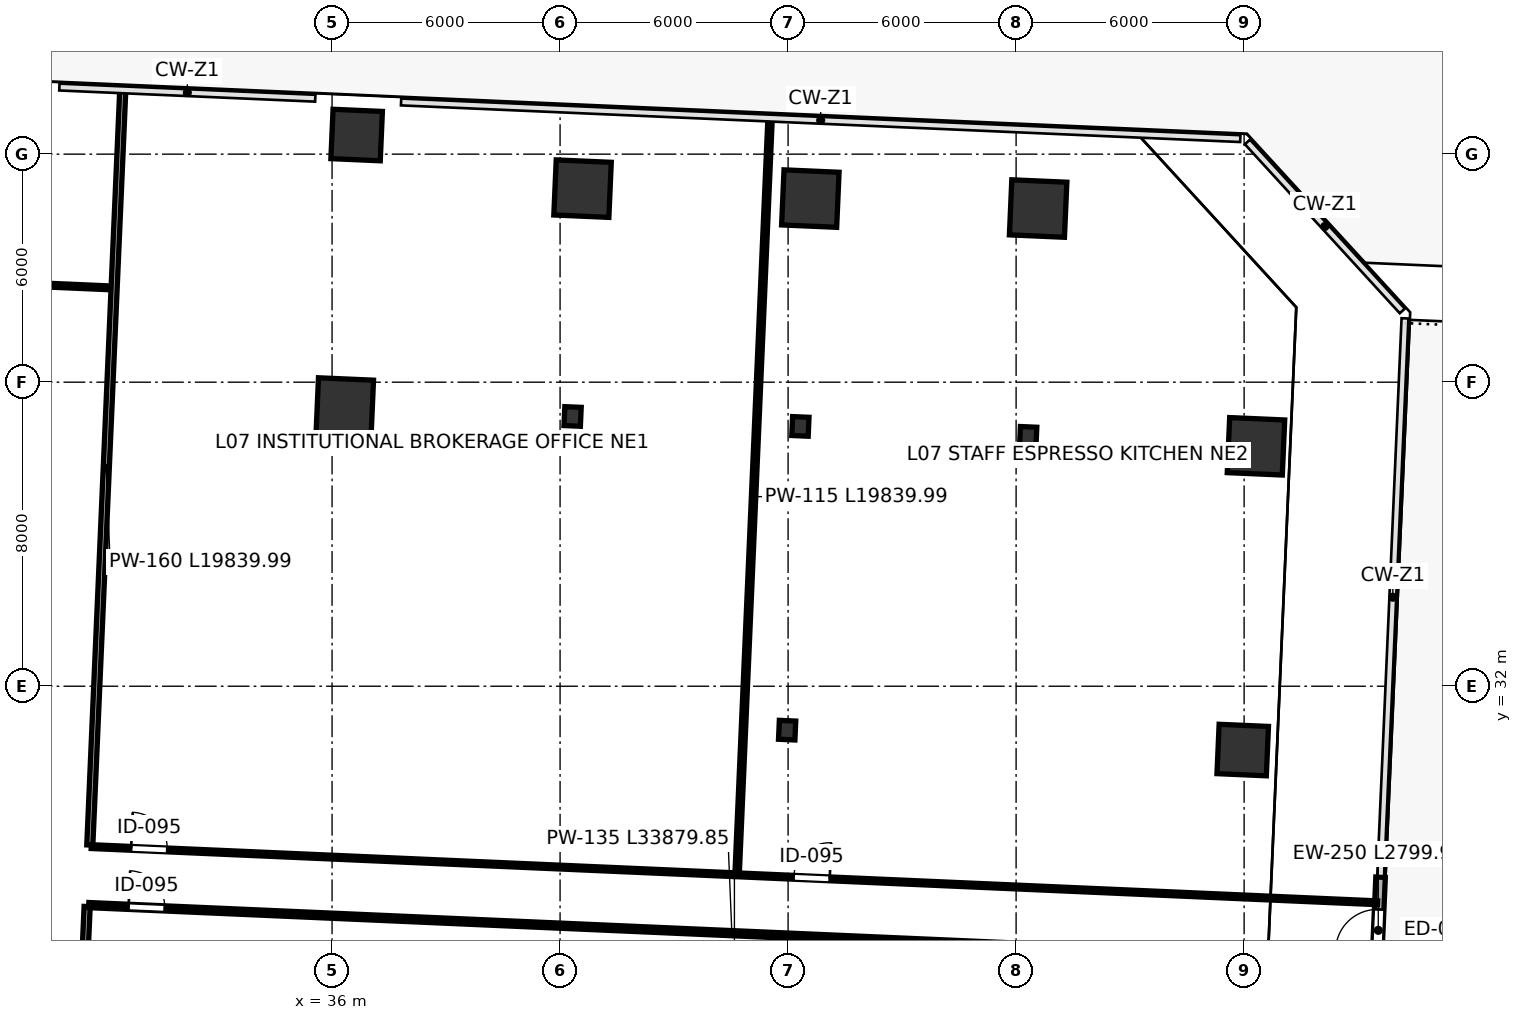
"""IFC4 building model, lengths in metres.
Left out: names, types, materials, properties, quantities, classifications, styles, units other than length and angle.
Written with IfcOpenShell. Run it as: python <this file> out.ifc"""

import sys

from ifc_helpers import new_model, si_unit, direction, frame, frame_2d, origin, origin_2d, place, context, subcontext, project, spatial, rectangle, i_section, extrude, source, transform, mapped, element, fill, save


model = new_model("IFC4")
c1 = context("Model", 3, precision=1e-05, world=origin(), true_north=direction((0.0, 1.0)))
c2 = subcontext(c1, "Body", "Model", "MODEL_VIEW")
j1 = project(units=[si_unit("LENGTHUNIT", "METRE"), si_unit("PLANEANGLEUNIT", "RADIAN")], contexts=[c1])
p1 = place(None, origin())
s1 = spatial("IfcSite", under=j1, at=p1, CompositionType="ELEMENT")
p2 = place(p1, origin())
s2 = spatial("IfcBuilding", under=s1, at=p2, CompositionType="ELEMENT")
p3 = place(p2, frame((0.0, 0.0, 32.8)))
s3 = spatial("IfcBuildingStorey", under=s2, at=p3, CompositionType="ELEMENT", Elevation=32.8)
m1 = source(origin(), c2, "Body", "SweptSolid", [
    extrude(rectangle(XDim=1.45, YDim=1.45, at=origin_2d()), origin(), (0.0, 0.0, 1.0), 4.799),
])
p4 = place(p3, frame((36.335, 39.36, 0.001), z_axis=(0.0, 0.0, 1.0), x_axis=(-0.999048221582, 0.043619387365, 0.0)))
e1 = element("IfcColumn", 1, at=p4, inside=s3, PredefinedType="COLUMN", context=c2, shape_type="MappedRepresentation", body=[
    mapped(m1, transform((0.0, 0.0, 0.0), scale=1.0)),
])
m2 = source(origin(), c2, "Body", "SweptSolid", [
    extrude(rectangle(XDim=1.3, YDim=1.3, at=origin_2d()), origin(), (0.0, 0.0, 1.0), 4.799),
])
p5 = place(p3, frame((36.647, 46.503, 0.001), z_axis=(0.0, 0.0, 1.0), x_axis=(-0.999048221582, 0.043619387365, 0.0)))
e2 = element("IfcColumn", 2, at=p5, inside=s3, PredefinedType="COLUMN", context=c2, shape_type="MappedRepresentation", body=[
    mapped(m2, transform((0.0, 0.0, 0.0), scale=1.0)),
])
m3 = source(origin(), c2, "Body", "SweptSolid", [
    extrude(i_section(OverallWidth=0.432, OverallDepth=0.498, WebThickness=0.056, FlangeThickness=0.089, FilletRadius=0.015, at=origin_2d()), origin(), (0.0, 0.0, 1.0), 4.799),
])
p6 = place(p3, frame((42.329, 39.098, 0.001), z_axis=(0.0, 0.0, 1.0), x_axis=(-0.999048221582, 0.043619387365, 0.0)))
e3 = element("IfcColumn", 3, at=p6, inside=s3, PredefinedType="COLUMN", context=c2, shape_type="MappedRepresentation", body=[
    mapped(m3, transform((0.0, 0.0, 0.0), scale=1.0)),
])
p7 = place(p3, frame((42.591, 45.093, 0.001), z_axis=(0.0, 0.0, 1.0), x_axis=(-0.999048221582, 0.043619387365, 0.0)))
e4 = element("IfcColumn", 4, at=p7, inside=s3, PredefinedType="COLUMN", context=c2, shape_type="MappedRepresentation", body=[
    mapped(m1, transform((0.0, 0.0, 0.0), scale=1.0)),
])
for number, where, z_axis, x_axis in (
    (5, (47.975, 30.844, 0.001), (0.0, 0.0, 1.0), (-0.999, 0.044, 0.0)),
    (6, (48.324, 38.836, 0.001), (0.0, 0.0, 1.0), (-0.999, 0.044, 0.0)),
):
    element("IfcColumn", number, at=place(p3, frame(where, z_axis=z_axis, x_axis=x_axis)), inside=s3, PredefinedType="COLUMN", context=c2, shape_type="MappedRepresentation", body=[
        mapped(m3, transform((0.0, 0.0, 0.0), scale=1.0)),
    ])
p8 = place(p3, frame((48.585, 44.831, 0.001), z_axis=(0.0, 0.0, 1.0), x_axis=(-0.999048221582, 0.043619387365, 0.0)))
e7 = element("IfcColumn", 7, at=p8, inside=s3, PredefinedType="COLUMN", context=c2, shape_type="MappedRepresentation", body=[
    mapped(m1, transform((0.0, 0.0, 0.0), scale=1.0)),
])
p9 = place(p3, frame((54.318, 38.575, 0.001), z_axis=(0.0, 0.0, 1.0), x_axis=(-0.999048221582, 0.043619387365, 0.0)))
e8 = element("IfcColumn", 8, at=p9, inside=s3, PredefinedType="COLUMN", context=c2, shape_type="MappedRepresentation", body=[
    mapped(m3, transform((0.0, 0.0, 0.0), scale=1.0)),
])
p10 = place(p3, frame((54.58, 44.569, 0.001), z_axis=(0.0, 0.0, 1.0), x_axis=(-0.999048221582, 0.043619387365, 0.0)))
e9 = element("IfcColumn", 9, at=p10, inside=s3, PredefinedType="COLUMN", context=c2, shape_type="MappedRepresentation", body=[
    mapped(m1, transform((0.0, 0.0, 0.0), scale=1.0)),
])
p11 = place(p3, frame((59.963, 30.321, 0.001), z_axis=(0.0, 0.0, 1.0), x_axis=(-0.999048221582, 0.043619387365, 0.0)))
e10 = element("IfcColumn", 10, at=p11, inside=s3, PredefinedType="COLUMN", context=c2, shape_type="MappedRepresentation", body=[
    mapped(m2, transform((0.0, 0.0, 0.0), scale=1.0)),
])
m4 = source(origin(), c2, "Body", "SweptSolid", [
    extrude(rectangle(XDim=1.45, YDim=1.45, at=origin_2d()), origin(), (0.0, 0.0, 1.0), 4.799),
])
p12 = place(p3, frame((60.312, 38.313, 0.001), z_axis=(0.0, 0.0, 1.0), x_axis=(-0.999048221582, 0.043619387365, 0.0)))
e11 = element("IfcColumn", 11, at=p12, inside=s3, PredefinedType="COLUMN", context=c2, shape_type="MappedRepresentation", body=[
    mapped(m4, transform((0.0, 0.0, 0.0), scale=1.0)),
])
p13 = place(p3, frame((63.469, 24.178, 0.0), z_axis=(0.0, 0.0, 1.0), x_axis=(0.04359614401, 0.999049236138, 0.0)))
e12 = element("IfcWall", 12, at=p13, inside=s3, PredefinedType="SOLIDWALL", context=c2, shape_type="SweptSolid", body=[
    extrude(rectangle(XDim=2.8, YDim=0.25, at=frame_2d((1.4, 0.0))), origin(), (0.0, 0.0, 1.0), 4.56),
])
p14 = place(p13, frame((0.85, 0.0, 0.0)))
e13 = element("IfcOpeningElement", 13, at=p14, cuts=e12, PredefinedType="OPENING", context=c2, shape_type="SweptSolid", body=[
    extrude(rectangle(XDim=1.1, YDim=2.2, at=frame_2d((0.55, 1.1))), frame((0.0, 0.135, 0.0), z_axis=(0.0, -1.0, 0.0), x_axis=(1.0, 0.0, 0.0)), (0.0, 0.0, 1.0), 0.27),
])
p15 = place(p3, frame((4.47, 43.604, 0.0), z_axis=(0.0, 0.0, 1.0), x_axis=(0.999047795436, -0.04362914662, 0.0)))
e14 = element("IfcWall", 14, at=p15, inside=s3, PredefinedType="PARTITIONING", context=c2, shape_type="SweptSolid", body=[
    extrude(rectangle(XDim=25.78, YDim=0.1, at=frame_2d((12.89, 0.0))), origin(), (0.0, 0.0, 1.0), 4.56),
])
p16 = place(p15, frame((0.91, 0.0, 0.0)))
e15 = element("IfcOpeningElement", 15, at=p16, cuts=e14, PredefinedType="OPENING", context=c2, shape_type="SweptSolid", body=[
    extrude(rectangle(XDim=0.95, YDim=2.15, at=frame_2d((0.475, 1.075))), frame((0.0, 0.06, 0.0), z_axis=(0.0, -1.0, 0.0), x_axis=(1.0, 0.0, 0.0)), (0.0, 0.0, 1.0), 0.12),
])
p17 = place(p3, frame((29.625, 27.822, 0.0), z_axis=(0.0, 0.0, 1.0), x_axis=(0.043623060059, 0.999048061222, 0.0)))
e16 = element("IfcWall", 16, at=p17, inside=s3, PredefinedType="PARTITIONING", context=c2, shape_type="SweptSolid", body=[
    extrude(rectangle(XDim=19.84, YDim=0.16, at=frame_2d((9.92, 0.0))), origin(), (0.0, 0.0, 1.0), 3.695),
])
p18 = place(p3, frame((29.006, 13.635, 0.0), z_axis=(0.0, 0.0, 1.0), x_axis=(0.043626715414, 0.999047901605, 0.0)))
e17 = element("IfcWall", 17, at=p18, inside=s3, PredefinedType="PARTITIONING", context=c2, shape_type="SweptSolid", body=[
    extrude(rectangle(XDim=12.58, YDim=0.16, at=frame_2d((6.29, 0.0))), origin(), (0.0, 0.0, 1.0), 4.56),
])
p19 = place(p3, frame((29.664, 27.78, 0.0), z_axis=(0.0, 0.0, 1.0), x_axis=(0.999048269666, -0.043618286038, 0.0)))
e18 = element("IfcWall", 18, at=p19, inside=s3, PredefinedType="PARTITIONING", context=c2, shape_type="SweptSolid", body=[
    extrude(rectangle(XDim=33.88, YDim=0.1, at=frame_2d((16.94, 0.0))), origin(), (0.0, 0.0, 1.0), 3.695),
])
p20 = place(p19, frame((1.05, 0.0, 0.0)))
e19 = element("IfcOpeningElement", 19, at=p20, cuts=e18, PredefinedType="OPENING", context=c2, shape_type="SweptSolid", body=[
    extrude(rectangle(XDim=0.95, YDim=2.15, at=frame_2d((0.475, 1.075))), frame((0.0, 0.06, 0.0), z_axis=(0.0, -1.0, 0.0), x_axis=(1.0, 0.0, 0.0)), (0.0, 0.0, 1.0), 0.12),
])
p21 = place(p19, frame((18.5, 0.0, 0.0)))
e20 = element("IfcOpeningElement", 20, at=p21, cuts=e18, PredefinedType="OPENING", context=c2, shape_type="SweptSolid", body=[
    extrude(rectangle(XDim=0.95, YDim=2.15, at=frame_2d((0.475, 1.075))), frame((0.0, 0.06, 0.0), z_axis=(0.0, -1.0, 0.0), x_axis=(1.0, 0.0, 0.0)), (0.0, 0.0, 1.0), 0.12),
])
p22 = place(p3, frame((29.597, 26.241, 0.0), z_axis=(0.0, 0.0, 1.0), x_axis=(0.999047941909, -0.043625792456, 0.0)))
e21 = element("IfcWall", 21, at=p22, inside=s3, PredefinedType="PARTITIONING", context=c2, shape_type="SweptSolid", body=[
    extrude(rectangle(XDim=33.88, YDim=0.135, at=frame_2d((16.94, 0.0))), origin(), (0.0, 0.0, 1.0), 3.695),
])
p23 = place(p22, frame((1.05, 0.0, 0.0)))
e22 = element("IfcOpeningElement", 22, at=p23, cuts=e21, PredefinedType="OPENING", context=c2, shape_type="SweptSolid", body=[
    extrude(rectangle(XDim=0.95, YDim=2.15, at=frame_2d((0.475, 1.075))), frame((0.0, 0.078, 0.0), z_axis=(0.0, -1.0, 0.0), x_axis=(1.0, 0.0, 0.0)), (0.0, 0.0, 1.0), 0.155),
])
p24 = place(p3, frame((46.659, 27.078, 0.0), z_axis=(0.0, 0.0, 1.0), x_axis=(0.043623060059, 0.999048061222, 0.0)))
e23 = element("IfcWall", 23, at=p24, inside=s3, PredefinedType="PARTITIONING", context=c2, shape_type="SweptSolid", body=[
    extrude(rectangle(XDim=19.84, YDim=0.115, at=frame_2d((9.92, 0.0))), origin(), (0.0, 0.0, 1.0), 3.923),
])
m5 = source(origin(), c2, "Body", "SweptSolid", [
    extrude(rectangle(XDim=1.1, YDim=2.2, at=frame_2d((0.55, 1.1))), frame((0.0, 0.025, 0.0), z_axis=(0.0, -1.0, 0.0), x_axis=(1.0, 0.0, 0.0)), (0.0, 0.0, 1.0), 0.05),
])
p25 = place(p14, origin())
e24 = element("IfcDoor", 24, at=p25, inside=s3, OperationType="SINGLE_SWING_LEFT", PredefinedType="DOOR", context=c2, shape_type="MappedRepresentation", body=[
    mapped(m5, transform((0.0, 0.0, 0.0), scale=1.0)),
])
fill(e13, e24)
m6 = source(origin(), c2, "Body", "SweptSolid", [
    extrude(rectangle(XDim=0.95, YDim=2.15, at=frame_2d((0.475, 1.075))), frame((0.0, 0.025, 0.0), z_axis=(0.0, -1.0, 0.0), x_axis=(1.0, 0.0, 0.0)), (0.0, 0.0, 1.0), 0.05),
])
p26 = place(p20, origin())
e25 = element("IfcDoor", 25, at=p26, inside=s3, OperationType="SINGLE_SWING_LEFT", PredefinedType="DOOR", context=c2, shape_type="MappedRepresentation", body=[
    mapped(m6, transform((0.0, 0.0, 0.0), scale=1.0)),
])
fill(e19, e25)
p27 = place(p21, origin())
e26 = element("IfcDoor", 26, at=p27, inside=s3, OperationType="SINGLE_SWING_RIGHT", PredefinedType="DOOR", context=c2, shape_type="MappedRepresentation", body=[
    mapped(m6, transform((0.0, 0.0, 0.0), scale=1.0)),
])
fill(e20, e26)
p28 = place(p23, origin())
e27 = element("IfcDoor", 27, at=p28, inside=s3, OperationType="SINGLE_SWING_LEFT", PredefinedType="DOOR", context=c2, shape_type="MappedRepresentation", body=[
    mapped(m6, transform((0.0, 0.0, 0.0), scale=1.0)),
])
fill(e22, e27)
save(model, sys.argv[1])
